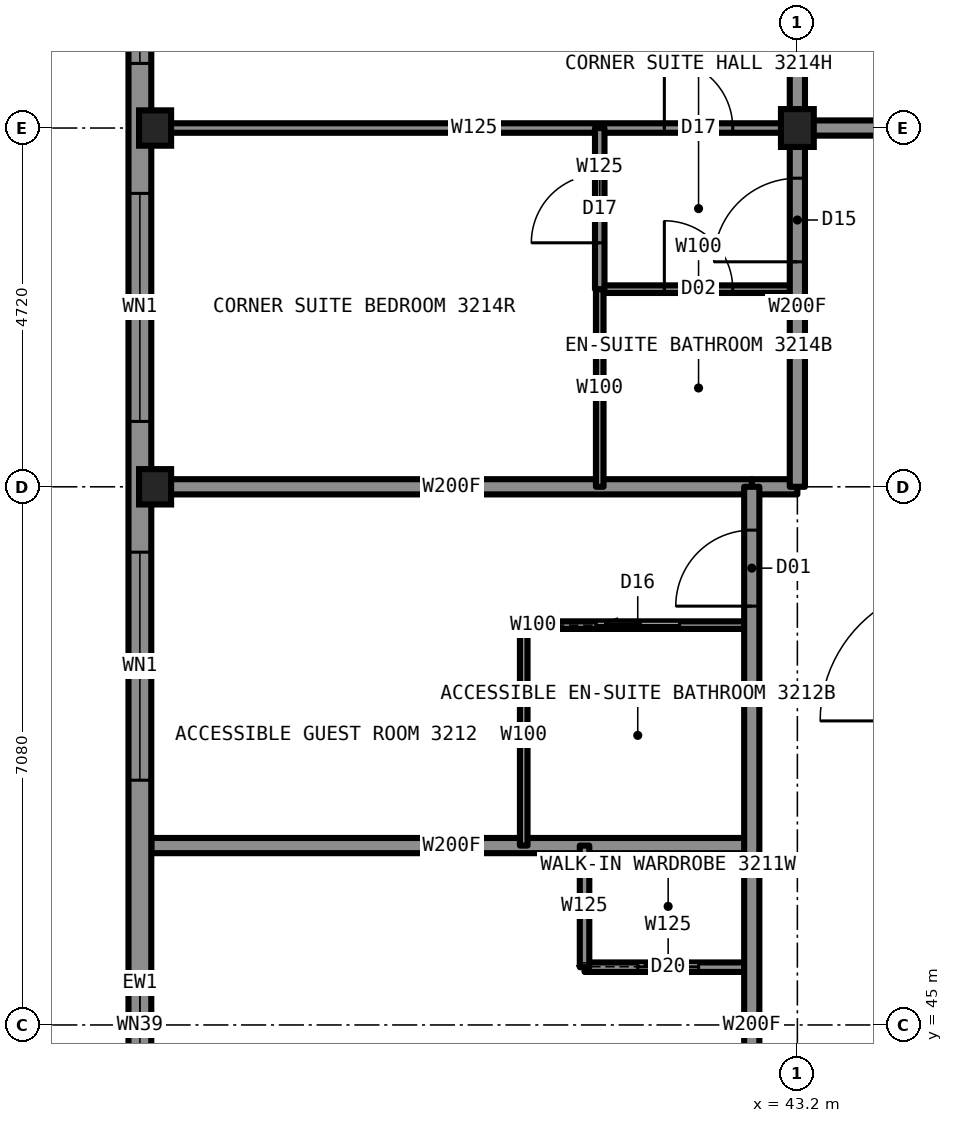
"""IFC4 building model, lengths in metres.
Left out: names, types, materials, properties, quantities, classifications, styles, units other than length and angle.
Written with IfcOpenShell. Run it as: python <this file> out.ifc"""

import sys

from ifc_helpers import new_model, si_unit, direction, frame, frame_2d, origin, origin_2d, place, context, subcontext, project, spatial, rectangle, i_section, extrude, element, fill, save


model = new_model("IFC4")
c1 = context("Model", 3, precision=1e-05, world=origin(), true_north=direction((0.0, 1.0)))
c2 = subcontext(c1, "Body", "Model", "MODEL_VIEW")
j1 = project(units=[si_unit("LENGTHUNIT", "METRE"), si_unit("PLANEANGLEUNIT", "RADIAN")], contexts=[c1])
p1 = place(None, origin())
s1 = spatial("IfcSite", under=j1, at=p1, CompositionType="ELEMENT")
p2 = place(p1, origin())
s2 = spatial("IfcBuilding", under=s1, at=p2, CompositionType="ELEMENT")
p3 = place(p2, frame((0.0, 0.0, 114.4)))
s3 = spatial("IfcBuildingStorey", under=s2, at=p3, CompositionType="ELEMENT", Elevation=114.4)
for number, where, z_axis, x_axis in (
    (1, (34.75, 52.08, 0.0), (0.0, 0.0, 1.0), (1.0, 0.0, 0.0)),
    (2, (34.75, 56.8, 0.0), (0.0, 0.0, 1.0), (1.0, 0.0, 0.0)),
):
    element("IfcColumn", number, at=place(p3, frame(where, z_axis=z_axis, x_axis=x_axis)), inside=s3, PredefinedType="COLUMN", context=c2, shape_type="SweptSolid", body=[
        extrude(i_section(OverallWidth=0.422, OverallDepth=0.465, WebThickness=0.045, FlangeThickness=0.073, at=origin_2d()), origin(), (0.0, 0.0, 1.0), 3.5),
    ])
p4 = place(p3, frame((43.2, 56.8, 0.0), z_axis=(0.0, 0.0, 1.0), x_axis=(1.0, 0.0, 0.0)))
e3 = element("IfcColumn", 3, at=p4, inside=s3, PredefinedType="COLUMN", context=c2, shape_type="SweptSolid", body=[
    extrude(i_section(OverallWidth=0.432, OverallDepth=0.498, WebThickness=0.056, FlangeThickness=0.089, at=origin_2d()), origin(), (0.0, 0.0, 1.0), 3.5),
])
p5 = place(p3, frame((40.4, 45.76, 0.0), z_axis=(0.0, 0.0, 1.0), x_axis=(1.0, 0.0, 0.0)))
e4 = element("IfcWall", 4, at=p5, inside=s3, PredefinedType="PARTITIONING", context=c2, shape_type="SweptSolid", body=[
    extrude(rectangle(XDim=2.2, YDim=0.125, at=frame_2d((1.1, 0.0))), origin(), (0.0, 0.0, 1.0), 3.33),
])
p6 = place(p5, frame((0.7, 0.0, 0.0)))
e5 = element("IfcOpeningElement", 5, at=p6, cuts=e4, PredefinedType="OPENING", context=c2, shape_type="SweptSolid", body=[
    extrude(rectangle(XDim=0.8, YDim=2.1, at=frame_2d((0.4, 1.05))), frame((0.0, 0.073, 0.0), z_axis=(0.0, -1.0, 0.0), x_axis=(1.0, 0.0, 0.0)), (0.0, 0.0, 1.0), 0.145),
])
p7 = place(p3, frame((43.2, 56.8, 0.0), z_axis=(0.0, 0.0, 1.0), x_axis=(1.0, 0.0, 0.0)))
e6 = element("IfcWall", 6, at=p7, inside=s3, PredefinedType="PARTITIONING", context=c2, shape_type="SweptSolid", body=[
    extrude(rectangle(XDim=23.6, YDim=0.2, at=frame_2d((11.8, 0.0))), origin(), (0.0, 0.0, 1.0), 3.33),
])
p8 = place(p7, frame((2.26, 0.0, 0.0)))
e7 = element("IfcOpeningElement", 7, at=p8, cuts=e6, PredefinedType="OPENING", context=c2, shape_type="SweptSolid", body=[
    extrude(rectangle(XDim=1.0, YDim=2.2, at=frame_2d((0.5, 1.1))), frame((0.0, 0.11, 0.0), z_axis=(0.0, -1.0, 0.0), x_axis=(1.0, 0.0, 0.0)), (0.0, 0.0, 1.0), 0.22),
])
p9 = place(p7, frame((6.18, 0.0, 0.0)))
e8 = element("IfcOpeningElement", 8, at=p9, cuts=e6, PredefinedType="OPENING", context=c2, shape_type="SweptSolid", body=[
    extrude(rectangle(XDim=1.0, YDim=2.2, at=frame_2d((0.5, 1.1))), frame((0.0, 0.11, 0.0), z_axis=(0.0, -1.0, 0.0), x_axis=(1.0, 0.0, 0.0)), (0.0, 0.0, 1.0), 0.22),
])
p10 = place(p7, frame((11.99, 0.0, 0.0)))
e9 = element("IfcOpeningElement", 9, at=p10, cuts=e6, PredefinedType="OPENING", context=c2, shape_type="SweptSolid", body=[
    extrude(rectangle(XDim=1.0, YDim=2.2, at=frame_2d((0.5, 1.1))), frame((0.0, 0.11, 0.0), z_axis=(0.0, -1.0, 0.0), x_axis=(1.0, 0.0, 0.0)), (0.0, 0.0, 1.0), 0.22),
])
p11 = place(p7, frame((17.16, 0.0, 0.0)))
e10 = element("IfcOpeningElement", 10, at=p11, cuts=e6, PredefinedType="OPENING", context=c2, shape_type="SweptSolid", body=[
    extrude(rectangle(XDim=1.0, YDim=2.2, at=frame_2d((0.5, 1.1))), frame((0.0, 0.11, 0.0), z_axis=(0.0, -1.0, 0.0), x_axis=(1.0, 0.0, 0.0)), (0.0, 0.0, 1.0), 0.22),
])
p12 = place(p3, frame((34.7, 56.8, 0.0), z_axis=(0.0, 0.0, 1.0), x_axis=(1.0, 0.0, 0.0)))
e11 = element("IfcWall", 11, at=p12, inside=s3, PredefinedType="PARTITIONING", context=c2, shape_type="SweptSolid", body=[
    extrude(rectangle(XDim=8.5, YDim=0.125, at=frame_2d((4.25, 0.0))), origin(), (0.0, 0.0, 1.0), 2.573),
])
p13 = place(p12, frame((6.75, 0.0, 0.0)))
e12 = element("IfcOpeningElement", 12, at=p13, cuts=e11, PredefinedType="OPENING", context=c2, shape_type="SweptSolid", body=[
    extrude(rectangle(XDim=0.9, YDim=2.2, at=frame_2d((0.45, 1.1))), frame((0.0, 0.073, 0.0), z_axis=(0.0, -1.0, 0.0), x_axis=(1.0, 0.0, 0.0)), (0.0, 0.0, 1.0), 0.145),
])
p14 = place(p3, frame((34.7, 47.36, 0.0), z_axis=(0.0, 0.0, 1.0), x_axis=(1.0, 0.0, 0.0)))
e13 = element("IfcWall", 13, at=p14, inside=s3, PredefinedType="PARTITIONING", context=c2, shape_type="SweptSolid", body=[
    extrude(rectangle(XDim=7.9, YDim=0.2, at=frame_2d((3.95, 0.0))), origin(), (0.0, 0.0, 1.0), 2.731),
])
p15 = place(p3, frame((39.6, 50.26, 0.0), z_axis=(0.0, 0.0, 1.0), x_axis=(1.0, 0.0, 0.0)))
e14 = element("IfcWall", 14, at=p15, inside=s3, PredefinedType="PARTITIONING", context=c2, shape_type="SweptSolid", body=[
    extrude(rectangle(XDim=3.0, YDim=0.1, at=frame_2d((1.5, 0.0))), origin(), (0.0, 0.0, 1.0), 3.33),
])
p16 = place(p15, frame((0.95, 0.0, 0.0)))
e15 = element("IfcOpeningElement", 15, at=p16, cuts=e14, PredefinedType="OPENING", context=c2, shape_type="SweptSolid", body=[
    extrude(rectangle(XDim=1.1, YDim=2.1, at=frame_2d((0.55, 1.05))), frame((0.0, 0.06, 0.0), z_axis=(0.0, -1.0, 0.0), x_axis=(1.0, 0.0, 0.0)), (0.0, 0.0, 1.0), 0.12),
])
p17 = place(p3, frame((42.6, 52.08, 0.0), z_axis=(0.0, 0.0, 1.0), x_axis=(1.0, 0.0, 0.0)))
e16 = element("IfcWall", 16, at=p17, inside=s3, PredefinedType="PARTITIONING", context=c2, shape_type="SweptSolid", body=[
    extrude(rectangle(XDim=0.6, YDim=0.2, at=frame_2d((0.3, 0.0))), origin(), (0.0, 0.0, 1.0), 2.573),
])
p18 = place(p3, frame((34.7, 52.08, 0.0), z_axis=(0.0, 0.0, 1.0), x_axis=(1.0, 0.0, 0.0)))
e17 = element("IfcWall", 17, at=p18, inside=s3, PredefinedType="PARTITIONING", context=c2, shape_type="SweptSolid", body=[
    extrude(rectangle(XDim=7.9, YDim=0.2, at=frame_2d((3.95, 0.0))), origin(), (0.0, 0.0, 1.0), 2.573),
])
p19 = place(p3, frame((40.6, 54.68, 0.0), z_axis=(0.0, 0.0, 1.0), x_axis=(1.0, 0.0, 0.0)))
e18 = element("IfcWall", 18, at=p19, inside=s3, PredefinedType="PARTITIONING", context=c2, shape_type="SweptSolid", body=[
    extrude(rectangle(XDim=2.6, YDim=0.1, at=frame_2d((1.3, 0.0))), origin(), (0.0, 0.0, 1.0), 3.33),
])
p20 = place(p19, frame((0.85, 0.0, 0.0)))
e19 = element("IfcOpeningElement", 19, at=p20, cuts=e18, PredefinedType="OPENING", context=c2, shape_type="SweptSolid", body=[
    extrude(rectangle(XDim=0.9, YDim=2.1, at=frame_2d((0.45, 1.05))), frame((0.0, 0.06, 0.0), z_axis=(0.0, -1.0, 0.0), x_axis=(1.0, 0.0, 0.0)), (0.0, 0.0, 1.0), 0.12),
])
p21 = place(p3, frame((43.2, 52.08, 0.0), z_axis=(0.0, 0.0, 1.0), x_axis=(0.0, 1.0, 0.0)))
e20 = element("IfcWall", 20, at=p21, inside=s3, PredefinedType="PARTITIONING", context=c2, shape_type="SweptSolid", body=[
    extrude(rectangle(XDim=4.72, YDim=0.2, at=frame_2d((2.36, 0.0))), origin(), (0.0, 0.0, 1.0), 3.33),
])
p22 = place(p21, frame((2.96, 0.0, 0.0)))
e21 = element("IfcOpeningElement", 21, at=p22, cuts=e20, PredefinedType="OPENING", context=c2, shape_type="SweptSolid", body=[
    extrude(rectangle(XDim=1.1, YDim=2.2, at=frame_2d((0.55, 1.1))), frame((0.0, 0.11, 0.0), z_axis=(0.0, -1.0, 0.0), x_axis=(1.0, 0.0, 0.0)), (0.0, 0.0, 1.0), 0.22),
])
p23 = place(p3, frame((43.2, 56.8, 0.0), z_axis=(0.0, 0.0, 1.0), x_axis=(0.0, 1.0, 0.0)))
e22 = element("IfcWall", 22, at=p23, inside=s3, PredefinedType="PARTITIONING", context=c2, shape_type="SweptSolid", body=[
    extrude(rectangle(XDim=8.5, YDim=0.2, at=frame_2d((4.25, 0.0))), origin(), (0.0, 0.0, 1.0), 2.573),
])
p24 = place(p3, frame((42.6, 37.92, 0.0), z_axis=(0.0, 0.0, 1.0), x_axis=(0.0, 1.0, 0.0)))
e23 = element("IfcWall", 23, at=p24, inside=s3, PredefinedType="PARTITIONING", context=c2, shape_type="SweptSolid", body=[
    extrude(rectangle(XDim=14.16, YDim=0.2, at=frame_2d((7.08, 0.0))), origin(), (0.0, 0.0, 1.0), 3.33),
])
p25 = place(p24, frame((3.0, 0.0, 0.0)))
e24 = element("IfcOpeningElement", 24, at=p25, cuts=e23, PredefinedType="OPENING", context=c2, shape_type="SweptSolid", body=[
    extrude(rectangle(XDim=1.0, YDim=2.2, at=frame_2d((0.5, 1.1))), frame((0.0, 0.11, 0.0), z_axis=(0.0, -1.0, 0.0), x_axis=(1.0, 0.0, 0.0)), (0.0, 0.0, 1.0), 0.22),
])
p26 = place(p24, frame((12.59, 0.0, 0.0)))
e25 = element("IfcOpeningElement", 25, at=p26, cuts=e23, PredefinedType="OPENING", context=c2, shape_type="SweptSolid", body=[
    extrude(rectangle(XDim=1.0, YDim=2.2, at=frame_2d((0.5, 1.1))), frame((0.0, 0.11, 0.0), z_axis=(0.0, -1.0, 0.0), x_axis=(1.0, 0.0, 0.0)), (0.0, 0.0, 1.0), 0.22),
])
p27 = place(p3, frame((40.6, 52.08, 0.0), z_axis=(0.0, 0.0, 1.0), x_axis=(0.0, 1.0, 0.0)))
e26 = element("IfcWall", 26, at=p27, inside=s3, PredefinedType="PARTITIONING", context=c2, shape_type="SweptSolid", body=[
    extrude(rectangle(XDim=2.6, YDim=0.1, at=frame_2d((1.3, 0.0))), origin(), (0.0, 0.0, 1.0), 3.33),
])
p28 = place(p3, frame((40.6, 54.68, 0.0), z_axis=(0.0, 0.0, 1.0), x_axis=(0.0, 1.0, 0.0)))
e27 = element("IfcWall", 27, at=p28, inside=s3, PredefinedType="PARTITIONING", context=c2, shape_type="SweptSolid", body=[
    extrude(rectangle(XDim=2.12, YDim=0.125, at=frame_2d((1.06, 0.0))), origin(), (0.0, 0.0, 1.0), 3.33),
])
p29 = place(p28, frame((0.61, 0.0, 0.0)))
e28 = element("IfcOpeningElement", 28, at=p29, cuts=e27, PredefinedType="OPENING", context=c2, shape_type="SweptSolid", body=[
    extrude(rectangle(XDim=0.9, YDim=2.2, at=frame_2d((0.45, 1.1))), frame((0.0, 0.073, 0.0), z_axis=(0.0, -1.0, 0.0), x_axis=(1.0, 0.0, 0.0)), (0.0, 0.0, 1.0), 0.145),
])
p30 = place(p3, frame((40.4, 45.76, 0.0), z_axis=(0.0, 0.0, 1.0), x_axis=(0.0, 1.0, 0.0)))
e29 = element("IfcWall", 29, at=p30, inside=s3, PredefinedType="PARTITIONING", context=c2, shape_type="SweptSolid", body=[
    extrude(rectangle(XDim=1.6, YDim=0.125, at=frame_2d((0.8, 0.0))), origin(), (0.0, 0.0, 1.0), 3.33),
])
p31 = place(p3, frame((39.6, 47.36, 0.0), z_axis=(0.0, 0.0, 1.0), x_axis=(0.0, 1.0, 0.0)))
e30 = element("IfcWall", 30, at=p31, inside=s3, PredefinedType="PARTITIONING", context=c2, shape_type="SweptSolid", body=[
    extrude(rectangle(XDim=2.9, YDim=0.1, at=frame_2d((1.45, 0.0))), origin(), (0.0, 0.0, 1.0), 3.33),
])
p32 = place(p3, frame((34.55, 60.1, 0.0), z_axis=(0.0, 0.0, 1.0), x_axis=(0.0, -1.0, 0.0)))
e31 = element("IfcWall", 31, at=p32, inside=s3, PredefinedType="SOLIDWALL", context=c2, shape_type="SweptSolid", body=[
    extrude(rectangle(XDim=30.2, YDim=0.3, at=frame_2d((15.1, 0.0))), origin(), (0.0, 0.0, 1.0), 2.83),
])
p33 = place(p32, frame((0.85, 0.0, 0.5)))
e32 = element("IfcOpeningElement", 32, at=p33, cuts=e31, PredefinedType="OPENING", context=c2, shape_type="SweptSolid", body=[
    extrude(rectangle(XDim=1.6, YDim=2.0, at=frame_2d((0.8, 1.0))), frame((0.0, 0.16, 0.0), z_axis=(0.0, -1.0, 0.0), x_axis=(1.0, 0.0, 0.0)), (0.0, 0.0, 1.0), 0.32),
])
p34 = place(p32, frame((4.16, 0.0, 0.5)))
e33 = element("IfcOpeningElement", 33, at=p34, cuts=e31, PredefinedType="OPENING", context=c2, shape_type="SweptSolid", body=[
    extrude(rectangle(XDim=3.0, YDim=2.0, at=frame_2d((1.5, 1.0))), frame((0.0, 0.16, 0.0), z_axis=(0.0, -1.0, 0.0), x_axis=(1.0, 0.0, 0.0)), (0.0, 0.0, 1.0), 0.32),
])
p35 = place(p32, frame((10.53, 0.0, 0.5)))
e34 = element("IfcOpeningElement", 34, at=p35, cuts=e31, PredefinedType="OPENING", context=c2, shape_type="SweptSolid", body=[
    extrude(rectangle(XDim=1.3, YDim=1.9, at=frame_2d((0.65, 0.95))), frame((0.0, 0.16, 0.0), z_axis=(0.0, -1.0, 0.0), x_axis=(1.0, 0.0, 0.0)), (0.0, 0.0, 1.0), 0.32),
])
p36 = place(p32, frame((13.6, 0.0, 0.5)))
e35 = element("IfcOpeningElement", 35, at=p36, cuts=e31, PredefinedType="OPENING", context=c2, shape_type="SweptSolid", body=[
    extrude(rectangle(XDim=3.0, YDim=2.0, at=frame_2d((1.5, 1.0))), frame((0.0, 0.16, 0.0), z_axis=(0.0, -1.0, 0.0), x_axis=(1.0, 0.0, 0.0)), (0.0, 0.0, 1.0), 0.32),
])
p37 = place(p32, frame((18.32, 0.0, 0.5)))
e36 = element("IfcOpeningElement", 36, at=p37, cuts=e31, PredefinedType="OPENING", context=c2, shape_type="SweptSolid", body=[
    extrude(rectangle(XDim=1.3, YDim=1.9, at=frame_2d((0.65, 0.95))), frame((0.0, 0.16, 0.0), z_axis=(0.0, -1.0, 0.0), x_axis=(1.0, 0.0, 0.0)), (0.0, 0.0, 1.0), 0.32),
])
p38 = place(p32, frame((23.04, 0.0, 0.5)))
e37 = element("IfcOpeningElement", 37, at=p38, cuts=e31, PredefinedType="OPENING", context=c2, shape_type="SweptSolid", body=[
    extrude(rectangle(XDim=3.0, YDim=2.0, at=frame_2d((1.5, 1.0))), frame((0.0, 0.16, 0.0), z_axis=(0.0, -1.0, 0.0), x_axis=(1.0, 0.0, 0.0)), (0.0, 0.0, 1.0), 0.32),
])
p39 = place(p32, frame((27.75, 0.0, 0.5)))
e38 = element("IfcOpeningElement", 38, at=p39, cuts=e31, PredefinedType="OPENING", context=c2, shape_type="SweptSolid", body=[
    extrude(rectangle(XDim=1.6, YDim=2.0, at=frame_2d((0.8, 1.0))), frame((0.0, 0.16, 0.0), z_axis=(0.0, -1.0, 0.0), x_axis=(1.0, 0.0, 0.0)), (0.0, 0.0, 1.0), 0.32),
])
p40 = place(p32, frame((9.88, 0.0, 0.5)))
e39 = element("IfcOpeningElement", 39, at=p40, cuts=e31, PredefinedType="OPENING", context=c2, shape_type="SweptSolid", body=[
    extrude(rectangle(XDim=0.6, YDim=0.9, at=frame_2d((0.3, 0.45))), frame((0.0, 0.16, 0.0), z_axis=(0.0, -1.0, 0.0), x_axis=(1.0, 0.0, 0.0)), (0.0, 0.0, 1.0), 0.32),
])
p41 = place(p32, frame((19.67, 0.0, 0.5)))
e40 = element("IfcOpeningElement", 40, at=p41, cuts=e31, PredefinedType="OPENING", context=c2, shape_type="SweptSolid", body=[
    extrude(rectangle(XDim=0.6, YDim=0.9, at=frame_2d((0.3, 0.45))), frame((0.0, 0.16, 0.0), z_axis=(0.0, -1.0, 0.0), x_axis=(1.0, 0.0, 0.0)), (0.0, 0.0, 1.0), 0.32),
])
p42 = place(p6, origin())
e41 = element("IfcDoor", 41, at=p42, inside=s3, OperationType="SLIDING_TO_LEFT", PredefinedType="DOOR", context=c2, shape_type="SweptSolid", body=[
    extrude(rectangle(XDim=0.8, YDim=2.1, at=frame_2d((0.4, 1.05))), frame((0.0, 0.025, 0.0), z_axis=(0.0, -1.0, 0.0), x_axis=(1.0, 0.0, 0.0)), (0.0, 0.0, 1.0), 0.05),
])
fill(e5, e41)
p43 = place(p26, origin())
e42 = element("IfcDoor", 42, at=p43, inside=s3, OperationType="SINGLE_SWING_LEFT", PredefinedType="DOOR", context=c2, shape_type="SweptSolid", body=[
    extrude(rectangle(XDim=1.0, YDim=2.2, at=frame_2d((0.5, 1.1))), frame((0.0, 0.025, 0.0), z_axis=(0.0, -1.0, 0.0), x_axis=(1.0, 0.0, 0.0)), (0.0, 0.0, 1.0), 0.05),
])
fill(e25, e42)
p44 = place(p16, origin())
e43 = element("IfcDoor", 43, at=p44, inside=s3, OperationType="SLIDING_TO_LEFT", PredefinedType="DOOR", context=c2, shape_type="SweptSolid", body=[
    extrude(rectangle(XDim=1.1, YDim=2.1, at=frame_2d((0.55, 1.05))), frame((0.0, 0.025, 0.0), z_axis=(0.0, -1.0, 0.0), x_axis=(1.0, 0.0, 0.0)), (0.0, 0.0, 1.0), 0.05),
])
fill(e15, e43)
p45 = place(p13, origin())
e44 = element("IfcDoor", 44, at=p45, inside=s3, OperationType="SINGLE_SWING_LEFT", PredefinedType="DOOR", context=c2, shape_type="SweptSolid", body=[
    extrude(rectangle(XDim=0.9, YDim=2.2, at=frame_2d((0.45, 1.1))), frame((0.0, 0.025, 0.0), z_axis=(0.0, -1.0, 0.0), x_axis=(1.0, 0.0, 0.0)), (0.0, 0.0, 1.0), 0.05),
])
fill(e12, e44)
p46 = place(p20, origin())
e45 = element("IfcDoor", 45, at=p46, inside=s3, OperationType="SINGLE_SWING_RIGHT", PredefinedType="DOOR", context=c2, shape_type="SweptSolid", body=[
    extrude(rectangle(XDim=0.9, YDim=2.1, at=frame_2d((0.45, 1.05))), frame((0.0, 0.025, 0.0), z_axis=(0.0, -1.0, 0.0), x_axis=(1.0, 0.0, 0.0)), (0.0, 0.0, 1.0), 0.05),
])
fill(e19, e45)
p47 = place(p22, origin())
e46 = element("IfcDoor", 46, at=p47, inside=s3, OperationType="SINGLE_SWING_LEFT", PredefinedType="DOOR", context=c2, shape_type="SweptSolid", body=[
    extrude(rectangle(XDim=1.1, YDim=2.2, at=frame_2d((0.55, 1.1))), frame((0.0, 0.025, 0.0), z_axis=(0.0, -1.0, 0.0), x_axis=(1.0, 0.0, 0.0)), (0.0, 0.0, 1.0), 0.05),
])
fill(e21, e46)
p48 = place(p29, origin())
e47 = element("IfcDoor", 47, at=p48, inside=s3, OperationType="SINGLE_SWING_LEFT", PredefinedType="DOOR", context=c2, shape_type="SweptSolid", body=[
    extrude(rectangle(XDim=0.9, YDim=2.2, at=frame_2d((0.45, 1.1))), frame((0.0, 0.025, 0.0), z_axis=(0.0, -1.0, 0.0), x_axis=(1.0, 0.0, 0.0)), (0.0, 0.0, 1.0), 0.05),
])
fill(e28, e47)
p49 = place(p33, origin())
e48 = element("IfcWindow", 48, at=p49, inside=s3, PartitioningType="SINGLE_PANEL", PredefinedType="WINDOW", context=c2, shape_type="SweptSolid", body=[
    extrude(rectangle(XDim=1.6, YDim=2.0, at=frame_2d((0.8, 1.0))), frame((0.0, 0.03, 0.0), z_axis=(0.0, -1.0, 0.0), x_axis=(1.0, 0.0, 0.0)), (0.0, 0.0, 1.0), 0.06),
])
fill(e32, e48)
p50 = place(p34, origin())
e49 = element("IfcWindow", 49, at=p50, inside=s3, PartitioningType="SINGLE_PANEL", PredefinedType="WINDOW", context=c2, shape_type="SweptSolid", body=[
    extrude(rectangle(XDim=3.0, YDim=2.0, at=frame_2d((1.5, 1.0))), frame((0.0, 0.03, 0.0), z_axis=(0.0, -1.0, 0.0), x_axis=(1.0, 0.0, 0.0)), (0.0, 0.0, 1.0), 0.06),
])
fill(e33, e49)
p51 = place(p35, origin())
e50 = element("IfcWindow", 50, at=p51, inside=s3, PartitioningType="SINGLE_PANEL", PredefinedType="WINDOW", context=c2, shape_type="SweptSolid", body=[
    extrude(rectangle(XDim=1.3, YDim=1.9, at=frame_2d((0.65, 0.95))), frame((0.0, 0.03, 0.0), z_axis=(0.0, -1.0, 0.0), x_axis=(1.0, 0.0, 0.0)), (0.0, 0.0, 1.0), 0.06),
])
fill(e34, e50)
p52 = place(p36, origin())
e51 = element("IfcWindow", 51, at=p52, inside=s3, PartitioningType="SINGLE_PANEL", PredefinedType="WINDOW", context=c2, shape_type="SweptSolid", body=[
    extrude(rectangle(XDim=3.0, YDim=2.0, at=frame_2d((1.5, 1.0))), frame((0.0, 0.03, 0.0), z_axis=(0.0, -1.0, 0.0), x_axis=(1.0, 0.0, 0.0)), (0.0, 0.0, 1.0), 0.06),
])
fill(e35, e51)
p53 = place(p40, origin())
e52 = element("IfcWindow", 52, at=p53, inside=s3, PartitioningType="SINGLE_PANEL", PredefinedType="WINDOW", context=c2, shape_type="SweptSolid", body=[
    extrude(rectangle(XDim=0.6, YDim=0.9, at=frame_2d((0.3, 0.45))), frame((0.0, 0.03, 0.0), z_axis=(0.0, -1.0, 0.0), x_axis=(1.0, 0.0, 0.0)), (0.0, 0.0, 1.0), 0.06),
])
fill(e39, e52)
save(model, sys.argv[1])
